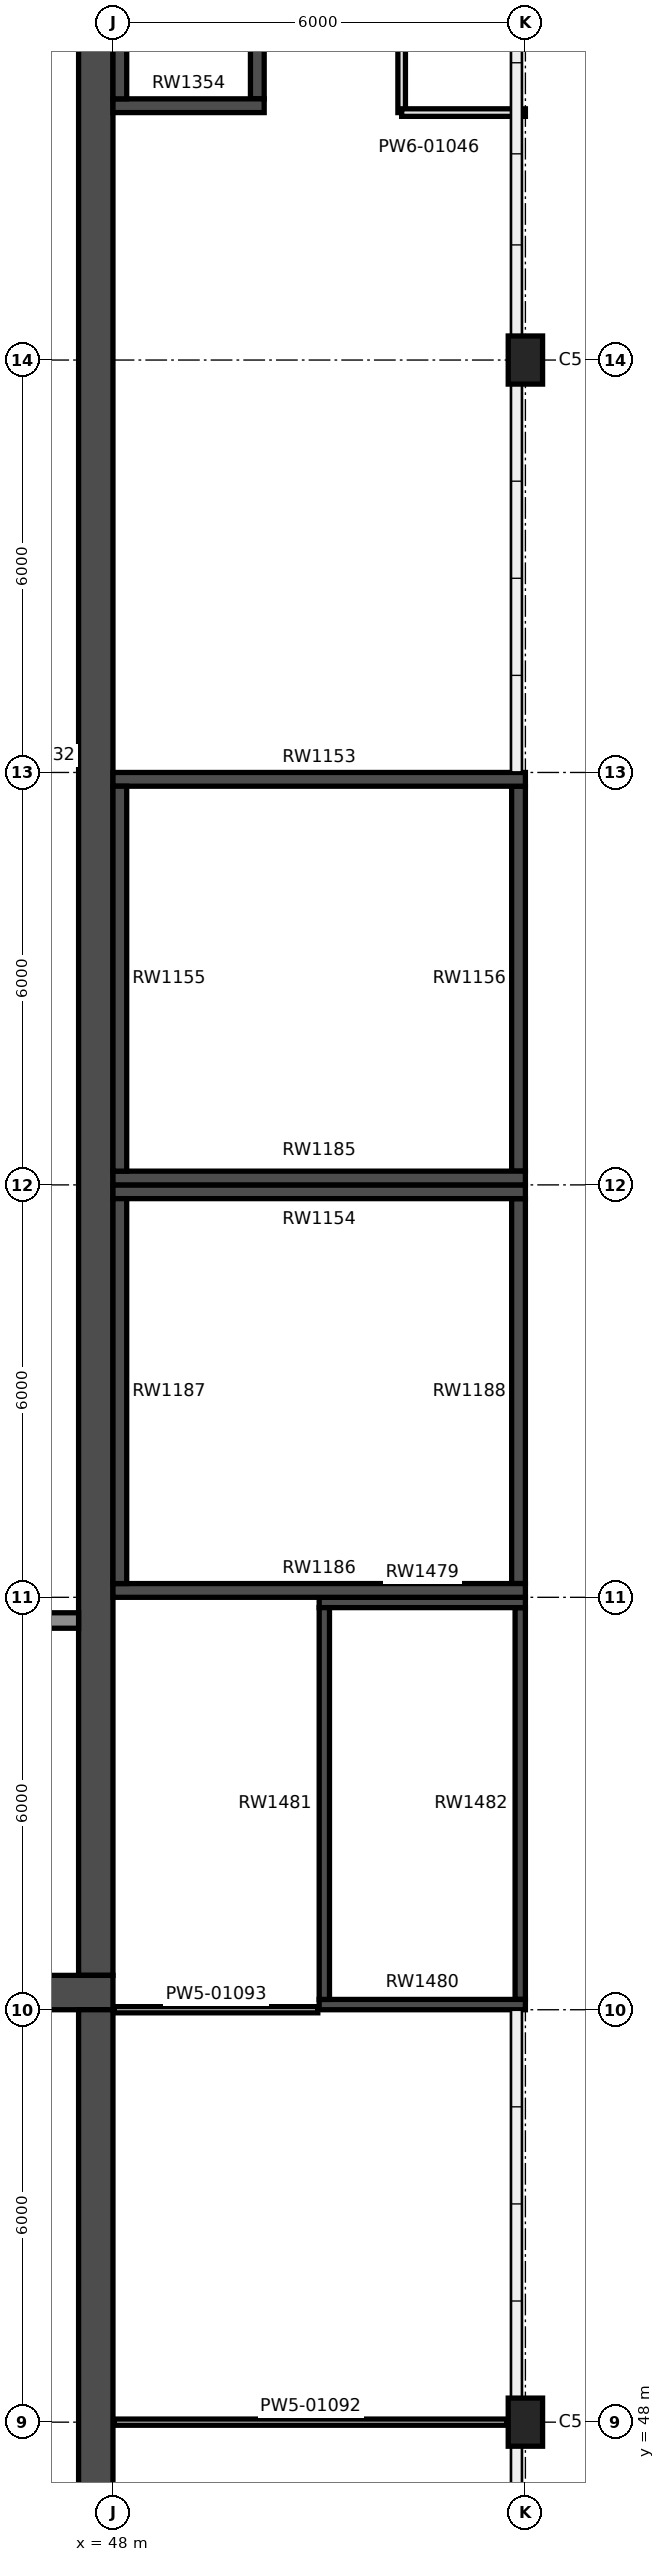
"""IFC4 building model, lengths in metres.
Left out: names, types, materials, properties, quantities, classifications, styles, units other than length and angle.
Written with IfcOpenShell. Run it as: python <this file> out.ifc"""

import sys

from ifc_helpers import new_model, si_unit, direction, frame, frame_2d, origin, origin_2d, place, context, subcontext, project, spatial, rectangle, extrude, element, fill, save


model = new_model("IFC4")
c1 = context("Model", 3, precision=1e-05, world=origin(), true_north=direction((0.0, 1.0)))
c2 = subcontext(c1, "Body", "Model", "MODEL_VIEW")
j1 = project(units=[si_unit("LENGTHUNIT", "METRE"), si_unit("PLANEANGLEUNIT", "RADIAN")], contexts=[c1])
p1 = place(None, origin())
s1 = spatial("IfcSite", under=j1, at=p1, CompositionType="ELEMENT")
p2 = place(p1, origin())
s2 = spatial("IfcBuilding", under=s1, at=p2, CompositionType="ELEMENT")
p3 = place(p2, frame((0.0, 0.0, 7.0)))
s3 = spatial("IfcBuildingStorey", under=s2, at=p3, CompositionType="ELEMENT", Elevation=7.0)
for number, where, z_axis, x_axis in (
    (1, (54.0, 48.0, 0.0), (0.0, 0.0, 1.0), (1.0, 0.0, 0.0)),
    (2, (54.0, 78.0, 0.0), (0.0, 0.0, 1.0), (1.0, 0.0, 0.0)),
):
    element("IfcColumn", number, at=place(p3, frame(where, z_axis=z_axis, x_axis=x_axis)), inside=s3, PredefinedType="COLUMN", context=c2, shape_type="SweptSolid", body=[
        extrude(rectangle(XDim=0.5, YDim=0.7, at=origin_2d()), origin(), (0.0, 0.0, 1.0), 5.0),
    ])
p4 = place(p3, frame((48.0, 71.9, 0.0), z_axis=(0.0, 0.0, 1.0), x_axis=(1.0, 0.0, 0.0)))
e3 = element("IfcWall", 3, at=p4, inside=s3, PredefinedType="SHEAR", context=c2, shape_type="SweptSolid", body=[
    extrude(rectangle(XDim=6.0, YDim=0.2, at=frame_2d((3.0, 0.0))), origin(), (0.0, 0.0, 1.0), 5.0),
])
p5 = place(p4, frame((4.6, 0.0, 0.0)))
e4 = element("IfcOpeningElement", 4, at=p5, cuts=e3, PredefinedType="OPENING", context=c2, shape_type="SweptSolid", body=[
    extrude(rectangle(XDim=1.1, YDim=2.2, at=frame_2d((0.55, 1.1))), frame((0.0, 0.11, 0.0), z_axis=(0.0, -1.0, 0.0), x_axis=(1.0, 0.0, 0.0)), (0.0, 0.0, 1.0), 0.22),
])
p6 = place(p3, frame((48.0, 66.1, 0.0), z_axis=(0.0, 0.0, 1.0), x_axis=(1.0, 0.0, 0.0)))
e5 = element("IfcWall", 5, at=p6, inside=s3, PredefinedType="SHEAR", context=c2, shape_type="SweptSolid", body=[
    extrude(rectangle(XDim=6.0, YDim=0.2, at=frame_2d((3.0, 0.0))), origin(), (0.0, 0.0, 1.0), 5.0),
])
for number, where, z_axis, x_axis in (
    (6, (48.1, 66.2, 0.0), (0.0, 0.0, 1.0), (0.0, 1.0, 0.0)),
    (7, (53.9, 66.2, 0.0), (0.0, 0.0, 1.0), (0.0, 1.0, 0.0)),
):
    element("IfcWall", number, at=place(p3, frame(where, z_axis=z_axis, x_axis=x_axis)), inside=s3, PredefinedType="SHEAR", context=c2, shape_type="SweptSolid", body=[
        extrude(rectangle(XDim=5.6, YDim=0.2, at=frame_2d((2.8, 0.0))), origin(), (0.0, 0.0, 1.0), 5.0),
    ])
p7 = place(p3, frame((48.0, 65.9, 0.0), z_axis=(0.0, 0.0, 1.0), x_axis=(1.0, 0.0, 0.0)))
e8 = element("IfcWall", 8, at=p7, inside=s3, PredefinedType="SHEAR", context=c2, shape_type="SweptSolid", body=[
    extrude(rectangle(XDim=6.0, YDim=0.2, at=frame_2d((3.0, 0.0))), origin(), (0.0, 0.0, 1.0), 5.0),
])
p8 = place(p3, frame((48.0, 60.1, 0.0), z_axis=(0.0, 0.0, 1.0), x_axis=(1.0, 0.0, 0.0)))
e9 = element("IfcWall", 9, at=p8, inside=s3, PredefinedType="SHEAR", context=c2, shape_type="SweptSolid", body=[
    extrude(rectangle(XDim=6.0, YDim=0.2, at=frame_2d((3.0, 0.0))), origin(), (0.0, 0.0, 1.0), 5.0),
])
p9 = place(p8, frame((0.825, 0.0, 0.0)))
e10 = element("IfcOpeningElement", 10, at=p9, cuts=e9, PredefinedType="OPENING", context=c2, shape_type="SweptSolid", body=[
    extrude(rectangle(XDim=1.8, YDim=2.2, at=frame_2d((0.9, 1.1))), frame((0.0, 0.11, 0.0), z_axis=(0.0, -1.0, 0.0), x_axis=(1.0, 0.0, 0.0)), (0.0, 0.0, 1.0), 0.22),
])
p10 = place(p3, frame((48.1, 60.2, 0.0), z_axis=(0.0, 0.0, 1.0), x_axis=(0.0, 1.0, 0.0)))
e11 = element("IfcWall", 11, at=p10, inside=s3, PredefinedType="SHEAR", context=c2, shape_type="SweptSolid", body=[
    extrude(rectangle(XDim=5.6, YDim=0.2, at=frame_2d((2.8, 0.0))), origin(), (0.0, 0.0, 1.0), 5.0),
])
p11 = place(p3, frame((53.9, 60.2, 0.0), z_axis=(0.0, 0.0, 1.0), x_axis=(0.0, 1.0, 0.0)))
e12 = element("IfcWall", 12, at=p11, inside=s3, PredefinedType="SHEAR", context=c2, shape_type="SweptSolid", body=[
    extrude(rectangle(XDim=5.6, YDim=0.2, at=frame_2d((2.8, 0.0))), origin(), (0.0, 0.0, 1.0), 5.0),
])
p12 = place(p11, frame((2.55, 0.0, 0.9)))
e13 = element("IfcOpeningElement", 13, at=p12, cuts=e12, PredefinedType="OPENING", context=c2, shape_type="SweptSolid", body=[
    extrude(rectangle(XDim=0.5, YDim=2.1, at=frame_2d((0.25, 1.05))), frame((0.0, 0.11, 0.0), z_axis=(0.0, -1.0, 0.0), x_axis=(1.0, 0.0, 0.0)), (0.0, 0.0, 1.0), 0.22),
])
p13 = place(p3, frame((48.0, 81.7, 0.0), z_axis=(0.0, 0.0, 1.0), x_axis=(1.0, 0.0, 0.0)))
e14 = element("IfcWall", 14, at=p13, inside=s3, PredefinedType="SHEAR", context=c2, shape_type="SweptSolid", body=[
    extrude(rectangle(XDim=2.2, YDim=0.2, at=frame_2d((1.1, 0.0))), origin(), (0.0, 0.0, 1.0), 5.0),
])
p14 = place(p13, frame((0.55, 0.0, 0.0)))
e15 = element("IfcOpeningElement", 15, at=p14, cuts=e14, PredefinedType="OPENING", context=c2, shape_type="SweptSolid", body=[
    extrude(rectangle(XDim=1.1, YDim=2.1, at=frame_2d((0.55, 1.05))), frame((0.0, 0.11, 0.0), z_axis=(0.0, -1.0, 0.0), x_axis=(1.0, 0.0, 0.0)), (0.0, 0.0, 1.0), 0.22),
])
for number, where, z_axis, x_axis in (
    (16, (48.1, 81.8, 0.0), (0.0, 0.0, 1.0), (0.0, 1.0, 0.0)),
    (17, (50.1, 81.8, 0.0), (0.0, 0.0, 1.0), (0.0, 1.0, 0.0)),
):
    element("IfcWall", number, at=place(p3, frame(where, z_axis=z_axis, x_axis=x_axis)), inside=s3, PredefinedType="SHEAR", context=c2, shape_type="SweptSolid", body=[
        extrude(rectangle(XDim=2.0, YDim=0.2, at=frame_2d((1.0, 0.0))), origin(), (0.0, 0.0, 1.0), 5.0),
    ])
for number, where, z_axis, x_axis in (
    (18, (51.0, 59.925, 0.0), (0.0, 0.0, 1.0), (1.0, 0.0, 0.0)),
    (19, (51.0, 54.075, 0.0), (0.0, 0.0, 1.0), (1.0, 0.0, 0.0)),
):
    element("IfcWall", number, at=place(p3, frame(where, z_axis=z_axis, x_axis=x_axis)), inside=s3, PredefinedType="SHEAR", context=c2, shape_type="SweptSolid", body=[
        extrude(rectangle(XDim=3.0, YDim=0.15, at=frame_2d((1.5, 0.0))), origin(), (0.0, 0.0, 1.0), 5.0),
    ])
for number, where, z_axis, x_axis in (
    (20, (51.075, 54.15, 0.0), (0.0, 0.0, 1.0), (0.0, 1.0, 0.0)),
    (21, (53.925, 54.15, 0.0), (0.0, 0.0, 1.0), (0.0, 1.0, 0.0)),
):
    element("IfcWall", number, at=place(p3, frame(where, z_axis=z_axis, x_axis=x_axis)), inside=s3, PredefinedType="SHEAR", context=c2, shape_type="SweptSolid", body=[
        extrude(rectangle(XDim=5.7, YDim=0.15, at=frame_2d((2.85, 0.0))), origin(), (0.0, 0.0, 1.0), 5.0),
    ])
p15 = place(p3, frame((47.75, 54.5, 0.0), z_axis=(0.0, 0.0, 1.0), x_axis=(0.0, 1.0, 0.0)))
e22 = element("IfcWall", 22, at=p15, inside=s3, PredefinedType="SHEAR", context=c2, shape_type="SweptSolid", body=[
    extrude(rectangle(XDim=35.5, YDim=0.5, at=frame_2d((17.75, 0.0))), origin(), (0.0, 0.0, 1.0), 5.0),
])
p16 = place(p15, frame((18.2, 0.0, 0.0)))
e23 = element("IfcOpeningElement", 23, at=p16, cuts=e22, PredefinedType="OPENING", context=c2, shape_type="SweptSolid", body=[
    extrude(rectangle(XDim=1.8, YDim=2.4, at=frame_2d((0.9, 1.2))), frame((0.0, 0.26, 0.0), z_axis=(0.0, -1.0, 0.0), x_axis=(1.0, 0.0, 0.0)), (0.0, 0.0, 1.0), 0.52),
])
p17 = place(p15, frame((21.0, 0.0, 0.0)))
e24 = element("IfcOpeningElement", 24, at=p17, cuts=e22, PredefinedType="OPENING", context=c2, shape_type="SweptSolid", body=[
    extrude(rectangle(XDim=1.8, YDim=2.4, at=frame_2d((0.9, 1.2))), frame((0.0, 0.26, 0.0), z_axis=(0.0, -1.0, 0.0), x_axis=(1.0, 0.0, 0.0)), (0.0, 0.0, 1.0), 0.52),
])
p18 = place(p3, frame((47.75, 30.0, 0.0), z_axis=(0.0, 0.0, 1.0), x_axis=(0.0, 1.0, 0.0)))
e25 = element("IfcWall", 25, at=p18, inside=s3, PredefinedType="SHEAR", context=c2, shape_type="SweptSolid", body=[
    extrude(rectangle(XDim=24.0, YDim=0.5, at=frame_2d((12.0, 0.0))), origin(), (0.0, 0.0, 1.0), 5.0),
])
p19 = place(p18, frame((2.25, 0.0, 0.0)))
e26 = element("IfcOpeningElement", 26, at=p19, cuts=e25, PredefinedType="OPENING", context=c2, shape_type="SweptSolid", body=[
    extrude(rectangle(XDim=1.5, YDim=2.1, at=frame_2d((0.75, 1.05))), frame((0.0, 0.26, 0.0), z_axis=(0.0, -1.0, 0.0), x_axis=(1.0, 0.0, 0.0)), (0.0, 0.0, 1.0), 0.52),
])
p20 = place(p18, frame((14.25, 0.0, 0.0)))
e27 = element("IfcOpeningElement", 27, at=p20, cuts=e25, PredefinedType="OPENING", context=c2, shape_type="SweptSolid", body=[
    extrude(rectangle(XDim=1.5, YDim=2.1, at=frame_2d((0.75, 1.05))), frame((0.0, 0.26, 0.0), z_axis=(0.0, -1.0, 0.0), x_axis=(1.0, 0.0, 0.0)), (0.0, 0.0, 1.0), 0.52),
])
p21 = place(p3, frame((40.0, 54.25, 0.0), z_axis=(0.0, 0.0, 1.0), x_axis=(1.0, 0.0, 0.0)))
e28 = element("IfcWall", 28, at=p21, inside=s3, PredefinedType="SHEAR", context=c2, shape_type="SweptSolid", body=[
    extrude(rectangle(XDim=8.0, YDim=0.5, at=frame_2d((4.0, 0.0))), origin(), (0.0, 0.0, 1.0), 5.0),
])
p22 = place(p3, frame((18.5, 59.663, -1.238), z_axis=(0.0, 0.0, 1.0), x_axis=(1.0, 0.0, 0.0)))
e29 = element("IfcWall", 29, at=p22, inside=s3, PredefinedType="SOLIDWALL", context=c2, shape_type="SweptSolid", body=[
    extrude(rectangle(XDim=29.0, YDim=0.225, at=frame_2d((14.5, 0.0))), origin(), (0.0, 0.0, 1.0), 1.1),
])
p23 = place(p3, frame((52.2, 81.6, 0.0), z_axis=(0.0, 0.0, 1.0), x_axis=(0.0, 1.0, 0.0)))
e30 = element("IfcWall", 30, at=p23, inside=s3, PredefinedType="PARTITIONING", context=c2, shape_type="SweptSolid", body=[
    extrude(rectangle(XDim=2.4, YDim=0.11, at=frame_2d((1.2, 0.0))), origin(), (0.0, 0.0, 1.0), 4.15),
])
p24 = place(p23, frame((0.85, 0.0, 0.0)))
e31 = element("IfcOpeningElement", 31, at=p24, cuts=e30, PredefinedType="OPENING", context=c2, shape_type="SweptSolid", body=[
    extrude(rectangle(XDim=0.75, YDim=2.04, at=frame_2d((0.375, 1.02))), frame((0.0, 0.065, 0.0), z_axis=(0.0, -1.0, 0.0), x_axis=(1.0, 0.0, 0.0)), (0.0, 0.0, 1.0), 0.13),
])
p25 = place(p3, frame((52.2, 81.6, 0.0), z_axis=(0.0, 0.0, 1.0), x_axis=(1.0, 0.0, 0.0)))
e32 = element("IfcWall", 32, at=p25, inside=s3, PredefinedType="PARTITIONING", context=c2, shape_type="SweptSolid", body=[
    extrude(rectangle(XDim=1.8, YDim=0.11, at=frame_2d((0.9, 0.0))), origin(), (0.0, 0.0, 1.0), 4.05),
])
p26 = place(p3, frame((48.02, 48.0, 0.0), z_axis=(0.0, 0.0, 1.0), x_axis=(1.0, 0.0, 0.0)))
e33 = element("IfcWall", 33, at=p26, inside=s3, PredefinedType="PARTITIONING", context=c2, shape_type="SweptSolid", body=[
    extrude(rectangle(XDim=5.71, YDim=0.09, at=frame_2d((2.855, 0.0))), origin(), (0.0, 0.0, 1.0), 4.05),
])
p27 = place(p26, frame((2.53, 0.0, 0.0)))
e34 = element("IfcOpeningElement", 34, at=p27, cuts=e33, PredefinedType="OPENING", context=c2, shape_type="SweptSolid", body=[
    extrude(rectangle(XDim=0.92, YDim=2.04, at=frame_2d((0.46, 1.02))), frame((0.0, 0.055, 0.0), z_axis=(0.0, -1.0, 0.0), x_axis=(1.0, 0.0, 0.0)), (0.0, 0.0, 1.0), 0.11),
])
p28 = place(p3, frame((48.02, 54.0, 0.0), z_axis=(0.0, 0.0, 1.0), x_axis=(1.0, 0.0, 0.0)))
e35 = element("IfcWall", 35, at=p28, inside=s3, PredefinedType="PARTITIONING", context=c2, shape_type="SweptSolid", body=[
    extrude(rectangle(XDim=2.96, YDim=0.09, at=frame_2d((1.48, 0.0))), origin(), (0.0, 0.0, 1.0), 4.15),
])
p29 = place(p12, origin())
e36 = element("IfcWindow", 36, at=p29, inside=s3, PartitioningType="SINGLE_PANEL", PredefinedType="WINDOW", context=c2, shape_type="SweptSolid", body=[
    extrude(rectangle(XDim=0.5, YDim=2.1, at=frame_2d((0.25, 1.05))), frame((0.0, 0.03, 0.0), z_axis=(0.0, -1.0, 0.0), x_axis=(1.0, 0.0, 0.0)), (0.0, 0.0, 1.0), 0.06),
])
fill(e13, e36)
p30 = place(p27, origin())
e37 = element("IfcDoor", 37, at=p30, inside=s3, OperationType="SINGLE_SWING_RIGHT", PredefinedType="DOOR", context=c2, shape_type="SweptSolid", body=[
    extrude(rectangle(XDim=0.92, YDim=2.04, at=frame_2d((0.46, 1.02))), frame((0.0, 0.025, 0.0), z_axis=(0.0, -1.0, 0.0), x_axis=(1.0, 0.0, 0.0)), (0.0, 0.0, 1.0), 0.05),
])
fill(e34, e37)
p31 = place(p5, frame((1.1, 0.0, 0.0), z_axis=(0.0, 0.0, 1.0), x_axis=(-1.0, 0.0, 0.0)))
e38 = element("IfcDoor", 38, at=p31, inside=s3, OperationType="SINGLE_SWING_RIGHT", PredefinedType="DOOR", context=c2, shape_type="SweptSolid", body=[
    extrude(rectangle(XDim=1.1, YDim=2.2, at=frame_2d((0.55, 1.1))), frame((0.0, 0.025, 0.0), z_axis=(0.0, -1.0, 0.0), x_axis=(1.0, 0.0, 0.0)), (0.0, 0.0, 1.0), 0.05),
])
fill(e4, e38)
p32 = place(p9, origin())
e39 = element("IfcDoor", 39, at=p32, inside=s3, OperationType="DOUBLE_DOOR_SINGLE_SWING", PredefinedType="DOOR", context=c2, shape_type="SweptSolid", body=[
    extrude(rectangle(XDim=1.8, YDim=2.2, at=frame_2d((0.9, 1.1))), frame((0.0, 0.025, 0.0), z_axis=(0.0, -1.0, 0.0), x_axis=(1.0, 0.0, 0.0)), (0.0, 0.0, 1.0), 0.05),
])
fill(e10, e39)
p33 = place(p24, frame((0.75, 0.0, 0.0), z_axis=(0.0, 0.0, 1.0), x_axis=(-1.0, 0.0, 0.0)))
e40 = element("IfcDoor", 40, at=p33, inside=s3, OperationType="SINGLE_SWING_RIGHT", PredefinedType="DOOR", context=c2, shape_type="SweptSolid", body=[
    extrude(rectangle(XDim=0.75, YDim=2.04, at=frame_2d((0.375, 1.02))), frame((0.0, 0.025, 0.0), z_axis=(0.0, -1.0, 0.0), x_axis=(1.0, 0.0, 0.0)), (0.0, 0.0, 1.0), 0.05),
])
fill(e31, e40)
p34 = place(p16, frame((1.8, 0.0, 0.0), z_axis=(0.0, 0.0, 1.0), x_axis=(-1.0, 0.0, 0.0)))
e41 = element("IfcDoor", 41, at=p34, inside=s3, OperationType="DOUBLE_DOOR_SINGLE_SWING", PredefinedType="DOOR", context=c2, shape_type="SweptSolid", body=[
    extrude(rectangle(XDim=1.8, YDim=2.4, at=frame_2d((0.9, 1.2))), frame((0.0, 0.025, 0.0), z_axis=(0.0, -1.0, 0.0), x_axis=(1.0, 0.0, 0.0)), (0.0, 0.0, 1.0), 0.05),
])
fill(e23, e41)
p35 = place(p17, frame((1.8, 0.0, 0.0), z_axis=(0.0, 0.0, 1.0), x_axis=(-1.0, 0.0, 0.0)))
e42 = element("IfcDoor", 42, at=p35, inside=s3, OperationType="DOUBLE_DOOR_SINGLE_SWING", PredefinedType="DOOR", context=c2, shape_type="SweptSolid", body=[
    extrude(rectangle(XDim=1.8, YDim=2.4, at=frame_2d((0.9, 1.2))), frame((0.0, 0.025, 0.0), z_axis=(0.0, -1.0, 0.0), x_axis=(1.0, 0.0, 0.0)), (0.0, 0.0, 1.0), 0.05),
])
fill(e24, e42)
p36 = place(p14, origin())
e43 = element("IfcDoor", 43, at=p36, inside=s3, OperationType="DOUBLE_DOOR_SLIDING", PredefinedType="DOOR", context=c2, shape_type="SweptSolid", body=[
    extrude(rectangle(XDim=1.1, YDim=2.1, at=frame_2d((0.55, 1.05))), frame((0.0, 0.025, 0.0), z_axis=(0.0, -1.0, 0.0), x_axis=(1.0, 0.0, 0.0)), (0.0, 0.0, 1.0), 0.05),
])
fill(e15, e43)
save(model, sys.argv[1])
